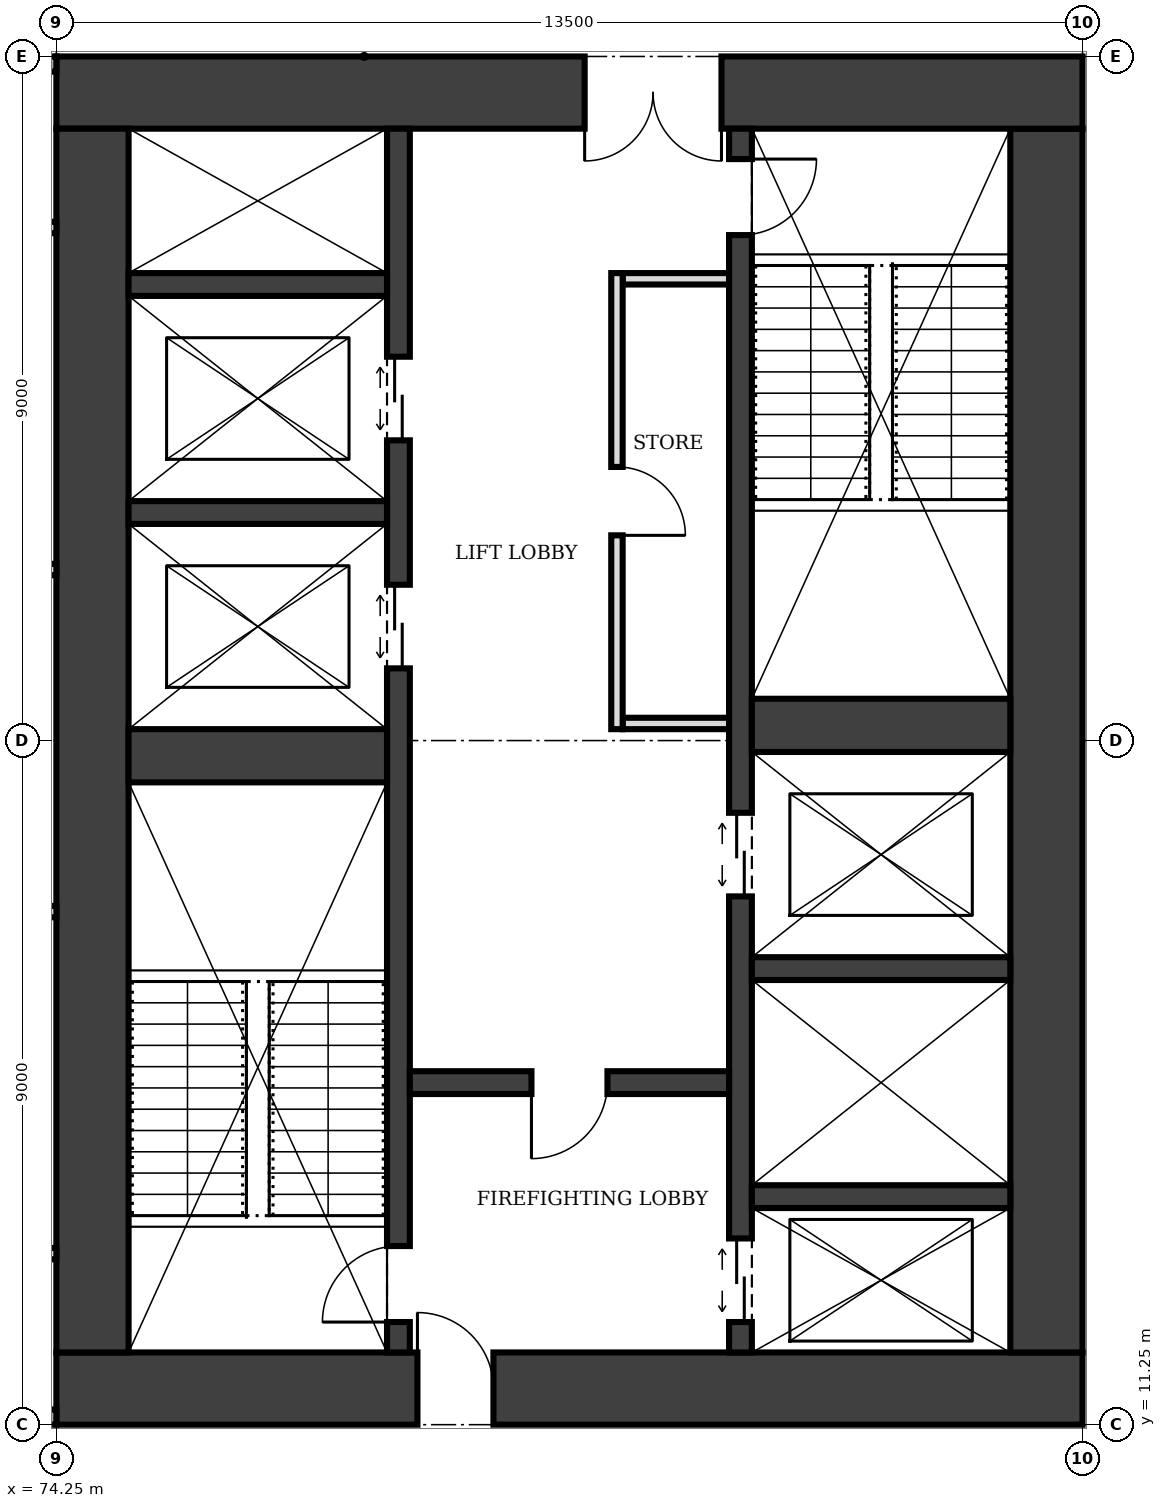
"""IFC4 building model, lengths in metres.
Left out: names, types, materials, properties, quantities, classifications, styles, units other than length and angle.
Written with IfcOpenShell. Run it as: python <this file> out.ifc"""

import sys

from ifc_helpers import new_model, si_unit, direction, frame, frame_2d, origin, place, context, subcontext, project, spatial, rectangle, extrude, element, fill, save


model = new_model("IFC4")
c1 = context("Model", 3, precision=1e-05, world=origin(), true_north=direction((0.0, 1.0)))
c2 = subcontext(c1, "Body", "Model", "MODEL_VIEW")
j1 = project(units=[si_unit("LENGTHUNIT", "METRE"), si_unit("PLANEANGLEUNIT", "RADIAN")], contexts=[c1])
p1 = place(None, origin())
s1 = spatial("IfcSite", under=j1, at=p1, CompositionType="ELEMENT")
p2 = place(p1, origin())
s2 = spatial("IfcBuilding", under=s1, at=p2, CompositionType="ELEMENT")
p3 = place(p2, frame((0.0, 0.0, 85.0)))
s3 = spatial("IfcBuildingStorey", under=s2, at=p3, CompositionType="ELEMENT", Elevation=85.0)
p4 = place(p3, frame((74.25, 11.725, 0.0), z_axis=(0.0, 0.0, 1.0), x_axis=(1.0, 0.0, 0.0)))
e1 = element("IfcWall", 1, at=p4, inside=s3, PredefinedType="SHEAR", context=c2, shape_type="SweptSolid", body=[
    extrude(rectangle(XDim=13.5, YDim=0.95, at=frame_2d((6.75, 0.0))), origin(), (0.0, 0.0, 1.0), 4.0),
])
p5 = place(p4, frame((4.75, 0.0, 0.0)))
e2 = element("IfcOpeningElement", 2, at=p5, cuts=e1, PredefinedType="OPENING", context=c2, shape_type="SweptSolid", body=[
    extrude(rectangle(XDim=1.0, YDim=2.1, at=frame_2d((0.5, 1.05))), frame((0.0, 0.485, 0.0), z_axis=(0.0, -1.0, 0.0), x_axis=(1.0, 0.0, 0.0)), (0.0, 0.0, 1.0), 0.97),
])
p6 = place(p3, frame((87.275, 12.2, 0.0), z_axis=(0.0, 0.0, 1.0), x_axis=(0.0, 1.0, 0.0)))
e3 = element("IfcWall", 3, at=p6, inside=s3, PredefinedType="SHEAR", context=c2, shape_type="SweptSolid", body=[
    extrude(rectangle(XDim=16.1, YDim=0.95, at=frame_2d((8.05, 0.0))), origin(), (0.0, 0.0, 1.0), 4.0),
])
p7 = place(p3, frame((87.75, 28.775, 0.0), z_axis=(0.0, 0.0, 1.0), x_axis=(-1.0, 0.0, 0.0)))
e4 = element("IfcWall", 4, at=p7, inside=s3, PredefinedType="SHEAR", context=c2, shape_type="SweptSolid", body=[
    extrude(rectangle(XDim=13.5, YDim=0.95, at=frame_2d((6.75, 0.0))), origin(), (0.0, 0.0, 1.0), 4.0),
])
p8 = place(p7, frame((4.75, 0.0, 0.0)))
e5 = element("IfcOpeningElement", 5, at=p8, cuts=e4, PredefinedType="OPENING", context=c2, shape_type="SweptSolid", body=[
    extrude(rectangle(XDim=1.8, YDim=2.1, at=frame_2d((0.9, 1.05))), frame((0.0, 0.485, 0.0), z_axis=(0.0, -1.0, 0.0), x_axis=(1.0, 0.0, 0.0)), (0.0, 0.0, 1.0), 0.97),
])
p9 = place(p3, frame((74.725, 28.3, 0.0), z_axis=(0.0, 0.0, 1.0), x_axis=(0.0, -1.0, 0.0)))
e6 = element("IfcWall", 6, at=p9, inside=s3, PredefinedType="SHEAR", context=c2, shape_type="SweptSolid", body=[
    extrude(rectangle(XDim=16.1, YDim=0.95, at=frame_2d((8.05, 0.0))), origin(), (0.0, 0.0, 1.0), 4.0),
])
p10 = place(p3, frame((78.75, 12.2, 0.0), z_axis=(0.0, 0.0, 1.0), x_axis=(0.0, 1.0, 0.0)))
e7 = element("IfcWall", 7, at=p10, inside=s3, PredefinedType="SHEAR", context=c2, shape_type="SweptSolid", body=[
    extrude(rectangle(XDim=16.1, YDim=0.3, at=frame_2d((8.05, 0.0))), origin(), (0.0, 0.0, 1.0), 4.0),
])
p11 = place(p10, frame((0.4, 0.0, 0.0)))
e8 = element("IfcOpeningElement", 8, at=p11, cuts=e7, PredefinedType="OPENING", context=c2, shape_type="SweptSolid", body=[
    extrude(rectangle(XDim=1.0, YDim=2.1, at=frame_2d((0.5, 1.05))), frame((0.0, 0.16, 0.0), z_axis=(0.0, -1.0, 0.0), x_axis=(1.0, 0.0, 0.0)), (0.0, 0.0, 1.0), 0.32),
])
p12 = place(p10, frame((9.0, 0.0, 0.0)))
e9 = element("IfcOpeningElement", 9, at=p12, cuts=e7, PredefinedType="OPENING", context=c2, shape_type="SweptSolid", body=[
    extrude(rectangle(XDim=1.1, YDim=2.1, at=frame_2d((0.55, 1.05))), frame((0.0, 0.16, 0.0), z_axis=(0.0, -1.0, 0.0), x_axis=(1.0, 0.0, 0.0)), (0.0, 0.0, 1.0), 0.32),
])
p13 = place(p10, frame((12.0, 0.0, 0.0)))
e10 = element("IfcOpeningElement", 10, at=p13, cuts=e7, PredefinedType="OPENING", context=c2, shape_type="SweptSolid", body=[
    extrude(rectangle(XDim=1.1, YDim=2.1, at=frame_2d((0.55, 1.05))), frame((0.0, 0.16, 0.0), z_axis=(0.0, -1.0, 0.0), x_axis=(1.0, 0.0, 0.0)), (0.0, 0.0, 1.0), 0.32),
])
p14 = place(p3, frame((83.25, 12.2, 0.0), z_axis=(0.0, 0.0, 1.0), x_axis=(0.0, 1.0, 0.0)))
e11 = element("IfcWall", 11, at=p14, inside=s3, PredefinedType="SHEAR", context=c2, shape_type="SweptSolid", body=[
    extrude(rectangle(XDim=16.1, YDim=0.3, at=frame_2d((8.05, 0.0))), origin(), (0.0, 0.0, 1.0), 4.0),
])
p15 = place(p14, frame((14.7, 0.0, 0.0)))
e12 = element("IfcOpeningElement", 12, at=p15, cuts=e11, PredefinedType="OPENING", context=c2, shape_type="SweptSolid", body=[
    extrude(rectangle(XDim=1.0, YDim=2.1, at=frame_2d((0.5, 1.05))), frame((0.0, 0.16, 0.0), z_axis=(0.0, -1.0, 0.0), x_axis=(1.0, 0.0, 0.0)), (0.0, 0.0, 1.0), 0.32),
])
p16 = place(p14, frame((0.4, 0.0, 0.0)))
e13 = element("IfcOpeningElement", 13, at=p16, cuts=e11, PredefinedType="OPENING", context=c2, shape_type="SweptSolid", body=[
    extrude(rectangle(XDim=1.1, YDim=2.1, at=frame_2d((0.55, 1.05))), frame((0.0, 0.16, 0.0), z_axis=(0.0, -1.0, 0.0), x_axis=(1.0, 0.0, 0.0)), (0.0, 0.0, 1.0), 0.32),
])
p17 = place(p14, frame((6.0, 0.0, 0.0)))
e14 = element("IfcOpeningElement", 14, at=p17, cuts=e11, PredefinedType="OPENING", context=c2, shape_type="SweptSolid", body=[
    extrude(rectangle(XDim=1.1, YDim=2.1, at=frame_2d((0.55, 1.05))), frame((0.0, 0.16, 0.0), z_axis=(0.0, -1.0, 0.0), x_axis=(1.0, 0.0, 0.0)), (0.0, 0.0, 1.0), 0.32),
])
p18 = place(p3, frame((75.2, 20.05, 0.0), z_axis=(0.0, 0.0, 1.0), x_axis=(1.0, 0.0, 0.0)))
e15 = element("IfcWall", 15, at=p18, inside=s3, PredefinedType="SHEAR", context=c2, shape_type="SweptSolid", body=[
    extrude(rectangle(XDim=3.4, YDim=0.7, at=frame_2d((1.7, 0.0))), origin(), (0.0, 0.0, 1.0), 4.0),
])
p19 = place(p3, frame((78.9, 15.75, 0.0), z_axis=(0.0, 0.0, 1.0), x_axis=(1.0, 0.0, 0.0)))
e16 = element("IfcWall", 16, at=p19, inside=s3, PredefinedType="SHEAR", context=c2, shape_type="SweptSolid", body=[
    extrude(rectangle(XDim=4.2, YDim=0.3, at=frame_2d((2.1, 0.0))), origin(), (0.0, 0.0, 1.0), 4.0),
])
p20 = place(p19, frame((1.6, 0.0, 0.0)))
e17 = element("IfcOpeningElement", 17, at=p20, cuts=e16, PredefinedType="OPENING", context=c2, shape_type="SweptSolid", body=[
    extrude(rectangle(XDim=1.0, YDim=2.1, at=frame_2d((0.5, 1.05))), frame((0.0, 0.16, 0.0), z_axis=(0.0, -1.0, 0.0), x_axis=(1.0, 0.0, 0.0)), (0.0, 0.0, 1.0), 0.32),
])
for number, where, z_axis, x_axis in (
    (18, (83.4, 14.25, 0.0), (0.0, 0.0, 1.0), (1.0, 0.0, 0.0)),
    (19, (83.4, 17.25, 0.0), (0.0, 0.0, 1.0), (1.0, 0.0, 0.0)),
):
    element("IfcWall", number, at=place(p3, frame(where, z_axis=z_axis, x_axis=x_axis)), inside=s3, PredefinedType="SHEAR", context=c2, shape_type="SweptSolid", body=[
        extrude(rectangle(XDim=3.4, YDim=0.3, at=frame_2d((1.7, 0.0))), origin(), (0.0, 0.0, 1.0), 4.0),
    ])
p21 = place(p3, frame((83.4, 20.45, 0.0), z_axis=(0.0, 0.0, 1.0), x_axis=(1.0, 0.0, 0.0)))
e20 = element("IfcWall", 20, at=p21, inside=s3, PredefinedType="SHEAR", context=c2, shape_type="SweptSolid", body=[
    extrude(rectangle(XDim=3.4, YDim=0.7, at=frame_2d((1.7, 0.0))), origin(), (0.0, 0.0, 1.0), 4.0),
])
for number, where, z_axis, x_axis in (
    (21, (75.2, 23.25, 0.0), (0.0, 0.0, 1.0), (1.0, 0.0, 0.0)),
    (22, (75.2, 26.25, 0.0), (0.0, 0.0, 1.0), (1.0, 0.0, 0.0)),
):
    element("IfcWall", number, at=place(p3, frame(where, z_axis=z_axis, x_axis=x_axis)), inside=s3, PredefinedType="SHEAR", context=c2, shape_type="SweptSolid", body=[
        extrude(rectangle(XDim=3.4, YDim=0.3, at=frame_2d((1.7, 0.0))), origin(), (0.0, 0.0, 1.0), 4.0),
    ])
p22 = place(p3, frame((81.625, 20.4, 0.0), z_axis=(0.0, 0.0, 1.0), x_axis=(0.0, 1.0, 0.0)))
e23 = element("IfcWall", 23, at=p22, inside=s3, PredefinedType="PARTITIONING", context=c2, shape_type="SweptSolid", body=[
    extrude(rectangle(XDim=6.0, YDim=0.15, at=frame_2d((3.0, 0.0))), origin(), (0.0, 0.0, 1.0), 3.75),
])
p23 = place(p22, frame((2.55, 0.0, 0.0)))
e24 = element("IfcOpeningElement", 24, at=p23, cuts=e23, PredefinedType="OPENING", context=c2, shape_type="SweptSolid", body=[
    extrude(rectangle(XDim=0.9, YDim=2.1, at=frame_2d((0.45, 1.05))), frame((0.0, 0.085, 0.0), z_axis=(0.0, -1.0, 0.0), x_axis=(1.0, 0.0, 0.0)), (0.0, 0.0, 1.0), 0.17),
])
for number, where, z_axis, x_axis in (
    (25, (81.7, 20.475, 0.0), (0.0, 0.0, 1.0), (1.0, 0.0, 0.0)),
    (26, (81.7, 26.325, 0.0), (0.0, 0.0, 1.0), (1.0, 0.0, 0.0)),
):
    element("IfcWall", number, at=place(p3, frame(where, z_axis=z_axis, x_axis=x_axis)), inside=s3, PredefinedType="PARTITIONING", context=c2, shape_type="SweptSolid", body=[
        extrude(rectangle(XDim=1.4, YDim=0.15, at=frame_2d((0.7, 0.0))), origin(), (0.0, 0.0, 1.0), 3.75),
    ])
for number, where, z_axis, x_axis in (
    (27, (68.57, 11.35, 0.0), (0.0, 0.0, 1.0), (1.0, 0.0, 0.0)),
    (28, (68.57, 29.15, 0.0), (0.0, 0.0, 1.0), (1.0, 0.0, 0.0)),
):
    element("IfcWall", number, at=place(p3, frame(where, z_axis=z_axis, x_axis=x_axis)), inside=s3, PredefinedType="SOLIDWALL", context=c2, shape_type="SweptSolid", body=[
        extrude(rectangle(XDim=5.68, YDim=0.2, at=frame_2d((2.84, 0.0))), origin(), (0.0, 0.0, 1.0), 2.85),
    ])
for number, where, z_axis, x_axis in (
    (29, (65.15, 13.5, 0.0), (0.0, 0.0, 1.0), (1.0, 0.0, 0.0)),
    (30, (65.15, 18.0, 0.0), (0.0, 0.0, 1.0), (1.0, 0.0, 0.0)),
    (31, (65.15, 22.5, 0.0), (0.0, 0.0, 1.0), (1.0, 0.0, 0.0)),
    (32, (65.15, 27.0, 0.0), (0.0, 0.0, 1.0), (1.0, 0.0, 0.0)),
):
    element("IfcWall", number, at=place(p3, frame(where, z_axis=z_axis, x_axis=x_axis)), inside=s3, PredefinedType="PARTITIONING", context=c2, shape_type="SweptSolid", body=[
        extrude(rectangle(XDim=9.1, YDim=0.15, at=frame_2d((4.55, 0.0))), origin(), (0.0, 0.0, 1.0), 3.75),
    ])
p24 = place(p5, origin())
e33 = element("IfcDoor", 33, at=p24, inside=s3, OperationType="SINGLE_SWING_LEFT", PredefinedType="DOOR", context=c2, shape_type="SweptSolid", body=[
    extrude(rectangle(XDim=1.0, YDim=2.1, at=frame_2d((0.5, 1.05))), frame((0.0, 0.025, 0.0), z_axis=(0.0, -1.0, 0.0), x_axis=(1.0, 0.0, 0.0)), (0.0, 0.0, 1.0), 0.05),
])
fill(e2, e33)
p25 = place(p8, origin())
e34 = element("IfcDoor", 34, at=p25, inside=s3, OperationType="DOUBLE_DOOR_SINGLE_SWING", PredefinedType="DOOR", context=c2, shape_type="SweptSolid", body=[
    extrude(rectangle(XDim=1.8, YDim=2.1, at=frame_2d((0.9, 1.05))), frame((0.0, 0.025, 0.0), z_axis=(0.0, -1.0, 0.0), x_axis=(1.0, 0.0, 0.0)), (0.0, 0.0, 1.0), 0.05),
])
fill(e5, e34)
p26 = place(p20, frame((1.0, 0.0, 0.0), z_axis=(0.0, 0.0, 1.0), x_axis=(-1.0, 0.0, 0.0)))
e35 = element("IfcDoor", 35, at=p26, inside=s3, OperationType="SINGLE_SWING_RIGHT", PredefinedType="DOOR", context=c2, shape_type="SweptSolid", body=[
    extrude(rectangle(XDim=1.0, YDim=2.1, at=frame_2d((0.5, 1.05))), frame((0.0, 0.025, 0.0), z_axis=(0.0, -1.0, 0.0), x_axis=(1.0, 0.0, 0.0)), (0.0, 0.0, 1.0), 0.05),
])
fill(e17, e35)
p27 = place(p11, origin())
e36 = element("IfcDoor", 36, at=p27, inside=s3, OperationType="SINGLE_SWING_LEFT", PredefinedType="DOOR", context=c2, shape_type="SweptSolid", body=[
    extrude(rectangle(XDim=1.0, YDim=2.1, at=frame_2d((0.5, 1.05))), frame((0.0, 0.025, 0.0), z_axis=(0.0, -1.0, 0.0), x_axis=(1.0, 0.0, 0.0)), (0.0, 0.0, 1.0), 0.05),
])
fill(e8, e36)
p28 = place(p15, frame((1.0, 0.0, 0.0), z_axis=(0.0, 0.0, 1.0), x_axis=(-1.0, 0.0, 0.0)))
e37 = element("IfcDoor", 37, at=p28, inside=s3, OperationType="SINGLE_SWING_LEFT", PredefinedType="DOOR", context=c2, shape_type="SweptSolid", body=[
    extrude(rectangle(XDim=1.0, YDim=2.1, at=frame_2d((0.5, 1.05))), frame((0.0, 0.025, 0.0), z_axis=(0.0, -1.0, 0.0), x_axis=(1.0, 0.0, 0.0)), (0.0, 0.0, 1.0), 0.05),
])
fill(e12, e37)
p29 = place(p16, origin())
e38 = element("IfcDoor", 38, at=p29, inside=s3, OperationType="DOUBLE_DOOR_SLIDING", PredefinedType="DOOR", context=c2, shape_type="SweptSolid", body=[
    extrude(rectangle(XDim=1.1, YDim=2.1, at=frame_2d((0.55, 1.05))), frame((0.0, 0.025, 0.0), z_axis=(0.0, -1.0, 0.0), x_axis=(1.0, 0.0, 0.0)), (0.0, 0.0, 1.0), 0.05),
])
fill(e13, e38)
p30 = place(p12, origin())
e39 = element("IfcDoor", 39, at=p30, inside=s3, OperationType="DOUBLE_DOOR_SLIDING", PredefinedType="DOOR", context=c2, shape_type="SweptSolid", body=[
    extrude(rectangle(XDim=1.1, YDim=2.1, at=frame_2d((0.55, 1.05))), frame((0.0, 0.025, 0.0), z_axis=(0.0, -1.0, 0.0), x_axis=(1.0, 0.0, 0.0)), (0.0, 0.0, 1.0), 0.05),
])
fill(e9, e39)
p31 = place(p13, origin())
e40 = element("IfcDoor", 40, at=p31, inside=s3, OperationType="DOUBLE_DOOR_SLIDING", PredefinedType="DOOR", context=c2, shape_type="SweptSolid", body=[
    extrude(rectangle(XDim=1.1, YDim=2.1, at=frame_2d((0.55, 1.05))), frame((0.0, 0.025, 0.0), z_axis=(0.0, -1.0, 0.0), x_axis=(1.0, 0.0, 0.0)), (0.0, 0.0, 1.0), 0.05),
])
fill(e10, e40)
p32 = place(p17, origin())
e41 = element("IfcDoor", 41, at=p32, inside=s3, OperationType="DOUBLE_DOOR_SLIDING", PredefinedType="DOOR", context=c2, shape_type="SweptSolid", body=[
    extrude(rectangle(XDim=1.1, YDim=2.1, at=frame_2d((0.55, 1.05))), frame((0.0, 0.025, 0.0), z_axis=(0.0, -1.0, 0.0), x_axis=(1.0, 0.0, 0.0)), (0.0, 0.0, 1.0), 0.05),
])
fill(e14, e41)
p33 = place(p23, frame((0.9, 0.0, 0.0), z_axis=(0.0, 0.0, 1.0), x_axis=(-1.0, 0.0, 0.0)))
e42 = element("IfcDoor", 42, at=p33, inside=s3, OperationType="SINGLE_SWING_RIGHT", PredefinedType="DOOR", context=c2, shape_type="SweptSolid", body=[
    extrude(rectangle(XDim=0.9, YDim=2.1, at=frame_2d((0.45, 1.05))), frame((0.0, 0.025, 0.0), z_axis=(0.0, -1.0, 0.0), x_axis=(1.0, 0.0, 0.0)), (0.0, 0.0, 1.0), 0.05),
])
fill(e24, e42)
save(model, sys.argv[1])
